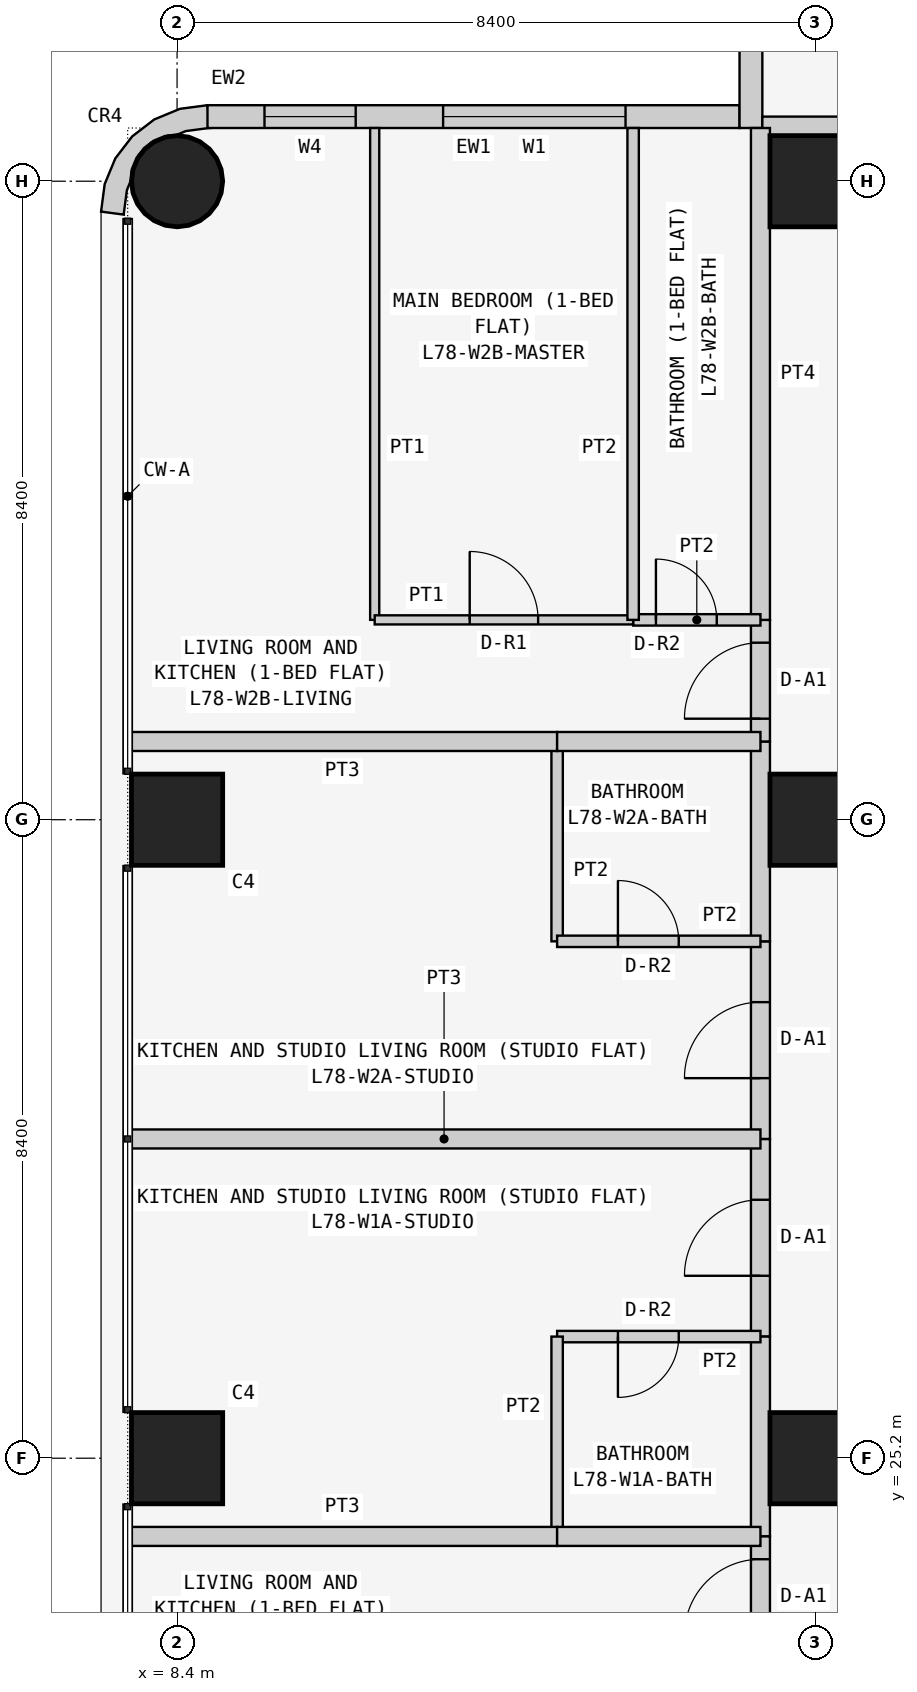
"""IFC4 building model, lengths in metres.
Left out: names, types, materials, properties, quantities, classifications, styles, units other than length and angle.
Written with IfcOpenShell. Run it as: python <this file> out.ifc"""

import sys

from ifc_helpers import new_model, si_unit, direction, frame, frame_2d, origin, origin_2d, place, context, subcontext, project, spatial, polyline, rectangle, circle, outline, extrude, element, fill, save


model = new_model("IFC4")
c1 = context("Model", 3, precision=1e-05, world=origin(), true_north=direction((0.0, 1.0)))
c2 = subcontext(c1, "Body", "Model", "MODEL_VIEW")
j1 = project(units=[si_unit("LENGTHUNIT", "METRE"), si_unit("PLANEANGLEUNIT", "RADIAN")], contexts=[c1])
p1 = place(None, origin())
s1 = spatial("IfcSite", under=j1, at=p1, CompositionType="ELEMENT")
p2 = place(p1, origin())
s2 = spatial("IfcBuilding", under=s1, at=p2, CompositionType="ELEMENT")
p3 = place(p2, frame((0.0, 0.0, 297.3)))
s3 = spatial("IfcBuildingStorey", under=s2, at=p3, CompositionType="ELEMENT", Elevation=297.3)
for number, where, z_axis, x_axis in (
    (1, (8.4, 25.2, 0.0), (0.0, 0.0, 1.0), (1.0, 0.0, 0.0)),
    (2, (8.4, 33.6, 0.0), (0.0, 0.0, 1.0), (1.0, 0.0, 0.0)),
):
    element("IfcColumn", number, at=place(p3, frame(where, z_axis=z_axis, x_axis=x_axis)), inside=s3, PredefinedType="COLUMN", context=c2, shape_type="SweptSolid", body=[
        extrude(rectangle(XDim=1.2, YDim=1.2, at=origin_2d()), origin(), (0.0, 0.0, 1.0), 3.6),
    ])
p4 = place(p3, frame((8.4, 42.0, 0.0), z_axis=(0.0, 0.0, 1.0), x_axis=(1.0, 0.0, 0.0)))
e3 = element("IfcColumn", 3, at=p4, inside=s3, PredefinedType="COLUMN", context=c2, shape_type="SweptSolid", body=[
    extrude(circle(Radius=0.6, at=origin_2d()), origin(), (0.0, 0.0, 1.0), 3.6),
])
for number, where, z_axis, x_axis in (
    (4, (16.8, 25.2, 0.0), (0.0, 0.0, 1.0), (1.0, 0.0, 0.0)),
    (5, (16.8, 33.6, 0.0), (0.0, 0.0, 1.0), (1.0, 0.0, 0.0)),
    (6, (16.8, 42.0, 0.0), (0.0, 0.0, 1.0), (1.0, 0.0, 0.0)),
):
    element("IfcColumn", number, at=place(p3, frame(where, z_axis=z_axis, x_axis=x_axis)), inside=s3, PredefinedType="COLUMN", context=c2, shape_type="SweptSolid", body=[
        extrude(rectangle(XDim=1.2, YDim=1.2, at=origin_2d()), origin(), (0.0, 0.0, 1.0), 3.6),
    ])
p5 = place(p3, frame((15.8, 42.85, 0.0), z_axis=(0.0, 0.0, 1.0), x_axis=(-1.0, 0.0, 0.0)))
e7 = element("IfcWall", 7, at=p5, inside=s3, PredefinedType="SOLIDWALL", context=c2, shape_type="SweptSolid", body=[
    extrude(rectangle(XDim=7.0, YDim=0.3, at=frame_2d((3.5, 0.0))), origin(), (0.0, 0.0, 1.0), 3.35),
])
p6 = place(p5, frame((1.5, 0.0, 0.9)))
e8 = element("IfcOpeningElement", 8, at=p6, cuts=e7, PredefinedType="OPENING", context=c2, shape_type="SweptSolid", body=[
    extrude(rectangle(XDim=2.4, YDim=1.5, at=frame_2d((1.2, 0.75))), frame((0.0, 0.16, 0.0), z_axis=(0.0, -1.0, 0.0), x_axis=(1.0, 0.0, 0.0)), (0.0, 0.0, 1.0), 0.32),
])
p7 = place(p5, frame((5.05, 0.0, 0.9)))
e9 = element("IfcOpeningElement", 9, at=p7, cuts=e7, PredefinedType="OPENING", context=c2, shape_type="SweptSolid", body=[
    extrude(rectangle(XDim=1.2, YDim=1.5, at=frame_2d((0.6, 0.75))), frame((0.0, 0.16, 0.0), z_axis=(0.0, -1.0, 0.0), x_axis=(1.0, 0.0, 0.0)), (0.0, 0.0, 1.0), 0.32),
])
p8 = place(p3, frame((15.95, 50.0, 0.0), z_axis=(0.0, 0.0, 1.0), x_axis=(0.0, -1.0, 0.0)))
e10 = element("IfcWall", 10, at=p8, inside=s3, PredefinedType="SOLIDWALL", context=c2, shape_type="SweptSolid", body=[
    extrude(rectangle(XDim=7.3, YDim=0.3, at=frame_2d((3.65, 0.0))), origin(), (0.0, 0.0, 1.0), 3.35),
])
p9 = place(p8, frame((3.1, 0.0, 0.9)))
e11 = element("IfcOpeningElement", 11, at=p9, cuts=e10, PredefinedType="OPENING", context=c2, shape_type="SweptSolid", body=[
    extrude(rectangle(XDim=2.4, YDim=1.5, at=frame_2d((1.2, 0.75))), frame((0.0, 0.16, 0.0), z_axis=(0.0, -1.0, 0.0), x_axis=(1.0, 0.0, 0.0)), (0.0, 0.0, 1.0), 0.32),
])
p10 = place(p8, frame((0.75, 0.0, 0.9)))
e12 = element("IfcOpeningElement", 12, at=p10, cuts=e10, PredefinedType="OPENING", context=c2, shape_type="SweptSolid", body=[
    extrude(rectangle(XDim=1.2, YDim=1.5, at=frame_2d((0.6, 0.75))), frame((0.0, 0.16, 0.0), z_axis=(0.0, -1.0, 0.0), x_axis=(1.0, 0.0, 0.0)), (0.0, 0.0, 1.0), 0.32),
])
p11 = place(p3, frame((8.762, 42.576, 0.0), z_axis=(0.0, 0.0, 1.0), x_axis=(-0.707106781187, 0.707106781187, 0.0)))
e13 = element("IfcWall", 13, at=p11, inside=s3, PredefinedType="SOLIDWALL", context=c2, shape_type="SweptSolid", body=[
    extrude(outline(polyline([(0.233, 0.114), (0.047, -0.129), (0.033, -0.143), (0.273, -0.327), (0.495, -0.037), (0.635, 0.3), (0.683, 0.663), (0.635, 1.025), (0.495, 1.363), (0.273, 1.653), (0.033, 1.469), (0.047, 1.455), (0.233, 1.212), (0.292, 1.069), (0.358, 1.003), (0.449, 0.783), (0.449, 0.543), (0.358, 0.322), (0.292, 0.257), (0.233, 0.114)])), origin(), (0.0, 0.0, 1.0), 3.35),
])
p12 = place(p3, frame((16.1, 42.725, 0.0), z_axis=(0.0, 0.0, 1.0), x_axis=(1.0, 0.0, 0.0)))
e14 = element("IfcWall", 14, at=p12, inside=s3, PredefinedType="PARTITIONING", context=c2, shape_type="SweptSolid", body=[
    extrude(rectangle(XDim=6.871, YDim=0.25, at=frame_2d((3.436, 0.0))), origin(), (0.0, 0.0, 1.0), 3.35),
])
p13 = place(p3, frame((16.075, 26.8, 0.0), z_axis=(0.0, 0.0, 1.0), x_axis=(0.0, 1.0, 0.0)))
e15 = element("IfcWall", 15, at=p13, inside=s3, PredefinedType="PARTITIONING", context=c2, shape_type="SweptSolid", body=[
    extrude(rectangle(XDim=2.6, YDim=0.25, at=frame_2d((1.3, 0.0))), origin(), (0.0, 0.0, 1.0), 3.35),
])
p14 = place(p13, frame((0.8, 0.0, 0.0)))
e16 = element("IfcOpeningElement", 16, at=p14, cuts=e15, PredefinedType="OPENING", context=c2, shape_type="SweptSolid", body=[
    extrude(rectangle(XDim=1.0, YDim=2.1, at=frame_2d((0.5, 1.05))), frame((0.0, 0.135, 0.0), z_axis=(0.0, -1.0, 0.0), x_axis=(1.0, 0.0, 0.0)), (0.0, 0.0, 1.0), 0.27),
])
p15 = place(p3, frame((16.075, 24.171, 0.0), z_axis=(0.0, 0.0, 1.0), x_axis=(0.0, 1.0, 0.0)))
e17 = element("IfcWall", 17, at=p15, inside=s3, PredefinedType="PARTITIONING", context=c2, shape_type="SweptSolid", body=[
    extrude(rectangle(XDim=2.629, YDim=0.25, at=frame_2d((1.314, 0.0))), origin(), (0.0, 0.0, 1.0), 3.35),
])
p16 = place(p3, frame((16.075, 22.571, 0.0), z_axis=(0.0, 0.0, 1.0), x_axis=(0.0, 1.0, 0.0)))
e18 = element("IfcWall", 18, at=p16, inside=s3, PredefinedType="PARTITIONING", context=c2, shape_type="SweptSolid", body=[
    extrude(rectangle(XDim=1.6, YDim=0.25, at=frame_2d((0.8, 0.0))), origin(), (0.0, 0.0, 1.0), 3.35),
])
p17 = place(p16, frame((0.3, 0.0, 0.0)))
e19 = element("IfcOpeningElement", 19, at=p17, cuts=e18, PredefinedType="OPENING", context=c2, shape_type="SweptSolid", body=[
    extrude(rectangle(XDim=1.0, YDim=2.1, at=frame_2d((0.5, 1.05))), frame((0.0, 0.135, 0.0), z_axis=(0.0, -1.0, 0.0), x_axis=(1.0, 0.0, 0.0)), (0.0, 0.0, 1.0), 0.27),
])
p18 = place(p3, frame((16.075, 29.4, 0.0), z_axis=(0.0, 0.0, 1.0), x_axis=(0.0, 1.0, 0.0)))
e20 = element("IfcWall", 20, at=p18, inside=s3, PredefinedType="PARTITIONING", context=c2, shape_type="SweptSolid", body=[
    extrude(rectangle(XDim=2.6, YDim=0.25, at=frame_2d((1.3, 0.0))), origin(), (0.0, 0.0, 1.0), 3.35),
])
p19 = place(p18, frame((0.8, 0.0, 0.0)))
e21 = element("IfcOpeningElement", 21, at=p19, cuts=e20, PredefinedType="OPENING", context=c2, shape_type="SweptSolid", body=[
    extrude(rectangle(XDim=1.0, YDim=2.1, at=frame_2d((0.5, 1.05))), frame((0.0, 0.135, 0.0), z_axis=(0.0, -1.0, 0.0), x_axis=(1.0, 0.0, 0.0)), (0.0, 0.0, 1.0), 0.27),
])
p20 = place(p3, frame((16.075, 32.0, 0.0), z_axis=(0.0, 0.0, 1.0), x_axis=(0.0, 1.0, 0.0)))
e22 = element("IfcWall", 22, at=p20, inside=s3, PredefinedType="PARTITIONING", context=c2, shape_type="SweptSolid", body=[
    extrude(rectangle(XDim=2.629, YDim=0.25, at=frame_2d((1.314, 0.0))), origin(), (0.0, 0.0, 1.0), 3.35),
])
p21 = place(p3, frame((16.075, 34.629, 0.0), z_axis=(0.0, 0.0, 1.0), x_axis=(0.0, 1.0, 0.0)))
e23 = element("IfcWall", 23, at=p21, inside=s3, PredefinedType="PARTITIONING", context=c2, shape_type="SweptSolid", body=[
    extrude(rectangle(XDim=1.6, YDim=0.25, at=frame_2d((0.8, 0.0))), origin(), (0.0, 0.0, 1.0), 3.35),
])
p22 = place(p21, frame((0.3, 0.0, 0.0)))
e24 = element("IfcOpeningElement", 24, at=p22, cuts=e23, PredefinedType="OPENING", context=c2, shape_type="SweptSolid", body=[
    extrude(rectangle(XDim=1.0, YDim=2.1, at=frame_2d((0.5, 1.05))), frame((0.0, 0.135, 0.0), z_axis=(0.0, -1.0, 0.0), x_axis=(1.0, 0.0, 0.0)), (0.0, 0.0, 1.0), 0.27),
])
p23 = place(p3, frame((16.075, 36.229, 0.0), z_axis=(0.0, 0.0, 1.0), x_axis=(0.0, 1.0, 0.0)))
e25 = element("IfcWall", 25, at=p23, inside=s3, PredefinedType="PARTITIONING", context=c2, shape_type="SweptSolid", body=[
    extrude(rectangle(XDim=6.471, YDim=0.25, at=frame_2d((3.235, 0.0))), origin(), (0.0, 0.0, 1.0), 3.35),
])
p24 = place(p3, frame((16.075, 26.8, 0.0), z_axis=(0.0, 0.0, 1.0), x_axis=(-1.0, 0.0, 0.0)))
e26 = element("IfcWall", 26, at=p24, inside=s3, PredefinedType="PARTITIONING", context=c2, shape_type="SweptSolid", body=[
    extrude(rectangle(XDim=2.675, YDim=0.15, at=frame_2d((1.337, 0.0))), origin(), (0.0, 0.0, 1.0), 3.35),
])
p25 = place(p24, frame((1.075, 0.0, 0.0)))
e27 = element("IfcOpeningElement", 27, at=p25, cuts=e26, PredefinedType="OPENING", context=c2, shape_type="SweptSolid", body=[
    extrude(rectangle(XDim=0.8, YDim=2.1, at=frame_2d((0.4, 1.05))), frame((0.0, 0.085, 0.0), z_axis=(0.0, -1.0, 0.0), x_axis=(1.0, 0.0, 0.0)), (0.0, 0.0, 1.0), 0.17),
])
p26 = place(p3, frame((13.4, 26.8, 0.0), z_axis=(0.0, 0.0, 1.0), x_axis=(0.0, -1.0, 0.0)))
e28 = element("IfcWall", 28, at=p26, inside=s3, PredefinedType="PARTITIONING", context=c2, shape_type="SweptSolid", body=[
    extrude(rectangle(XDim=2.629, YDim=0.15, at=frame_2d((1.314, 0.0))), origin(), (0.0, 0.0, 1.0), 3.35),
])
p27 = place(p3, frame((13.4, 24.171, 0.0), z_axis=(0.0, 0.0, 1.0), x_axis=(-1.0, 0.0, 0.0)))
e29 = element("IfcWall", 29, at=p27, inside=s3, PredefinedType="PARTITIONING", context=c2, shape_type="SweptSolid", body=[
    extrude(rectangle(XDim=5.65, YDim=0.25, at=frame_2d((2.825, 0.0))), origin(), (0.0, 0.0, 1.0), 3.35),
])
p28 = place(p3, frame((7.75, 29.4, 0.0), z_axis=(0.0, 0.0, 1.0), x_axis=(1.0, 0.0, 0.0)))
e30 = element("IfcWall", 30, at=p28, inside=s3, PredefinedType="PARTITIONING", context=c2, shape_type="SweptSolid", body=[
    extrude(rectangle(XDim=8.325, YDim=0.25, at=frame_2d((4.163, 0.0))), origin(), (0.0, 0.0, 1.0), 3.35),
])
p29 = place(p3, frame((13.4, 24.171, 0.0), z_axis=(0.0, 0.0, 1.0), x_axis=(1.0, 0.0, 0.0)))
e31 = element("IfcWall", 31, at=p29, inside=s3, PredefinedType="PARTITIONING", context=c2, shape_type="SweptSolid", body=[
    extrude(rectangle(XDim=2.675, YDim=0.25, at=frame_2d((1.337, 0.0))), origin(), (0.0, 0.0, 1.0), 3.35),
])
p30 = place(p3, frame((13.4, 34.629, 0.0), z_axis=(0.0, 0.0, 1.0), x_axis=(0.0, -1.0, 0.0)))
e32 = element("IfcWall", 32, at=p30, inside=s3, PredefinedType="PARTITIONING", context=c2, shape_type="SweptSolid", body=[
    extrude(rectangle(XDim=2.629, YDim=0.15, at=frame_2d((1.314, 0.0))), origin(), (0.0, 0.0, 1.0), 3.35),
])
p31 = place(p3, frame((13.4, 32.0, 0.0), z_axis=(0.0, 0.0, 1.0), x_axis=(1.0, 0.0, 0.0)))
e33 = element("IfcWall", 33, at=p31, inside=s3, PredefinedType="PARTITIONING", context=c2, shape_type="SweptSolid", body=[
    extrude(rectangle(XDim=2.675, YDim=0.15, at=frame_2d((1.337, 0.0))), origin(), (0.0, 0.0, 1.0), 3.35),
])
p32 = place(p31, frame((0.8, 0.0, 0.0)))
e34 = element("IfcOpeningElement", 34, at=p32, cuts=e33, PredefinedType="OPENING", context=c2, shape_type="SweptSolid", body=[
    extrude(rectangle(XDim=0.8, YDim=2.1, at=frame_2d((0.4, 1.05))), frame((0.0, 0.085, 0.0), z_axis=(0.0, -1.0, 0.0), x_axis=(1.0, 0.0, 0.0)), (0.0, 0.0, 1.0), 0.17),
])
p33 = place(p3, frame((7.75, 34.629, 0.0), z_axis=(0.0, 0.0, 1.0), x_axis=(1.0, 0.0, 0.0)))
e35 = element("IfcWall", 35, at=p33, inside=s3, PredefinedType="PARTITIONING", context=c2, shape_type="SweptSolid", body=[
    extrude(rectangle(XDim=5.65, YDim=0.25, at=frame_2d((2.825, 0.0))), origin(), (0.0, 0.0, 1.0), 3.35),
])
p34 = place(p3, frame((13.4, 34.629, 0.0), z_axis=(0.0, 0.0, 1.0), x_axis=(1.0, 0.0, 0.0)))
e36 = element("IfcWall", 36, at=p34, inside=s3, PredefinedType="PARTITIONING", context=c2, shape_type="SweptSolid", body=[
    extrude(rectangle(XDim=2.675, YDim=0.25, at=frame_2d((1.337, 0.0))), origin(), (0.0, 0.0, 1.0), 3.35),
])
p35 = place(p3, frame((14.4, 36.229, 0.0), z_axis=(0.0, 0.0, 1.0), x_axis=(1.0, 0.0, 0.0)))
e37 = element("IfcWall", 37, at=p35, inside=s3, PredefinedType="PARTITIONING", context=c2, shape_type="SweptSolid", body=[
    extrude(rectangle(XDim=1.675, YDim=0.15, at=frame_2d((0.837, 0.0))), origin(), (0.0, 0.0, 1.0), 3.35),
])
p36 = place(p35, frame((0.3, 0.0, 0.0)))
e38 = element("IfcOpeningElement", 38, at=p36, cuts=e37, PredefinedType="OPENING", context=c2, shape_type="SweptSolid", body=[
    extrude(rectangle(XDim=0.8, YDim=2.1, at=frame_2d((0.4, 1.05))), frame((0.0, 0.085, 0.0), z_axis=(0.0, -1.0, 0.0), x_axis=(1.0, 0.0, 0.0)), (0.0, 0.0, 1.0), 0.17),
])
p37 = place(p3, frame((11.0, 42.7, 0.0), z_axis=(0.0, 0.0, 1.0), x_axis=(0.0, -1.0, 0.0)))
e39 = element("IfcWall", 39, at=p37, inside=s3, PredefinedType="PARTITIONING", context=c2, shape_type="SweptSolid", body=[
    extrude(rectangle(XDim=6.471, YDim=0.12, at=frame_2d((3.235, 0.0))), origin(), (0.0, 0.0, 1.0), 3.35),
])
p38 = place(p3, frame((11.0, 36.229, 0.0), z_axis=(0.0, 0.0, 1.0), x_axis=(1.0, 0.0, 0.0)))
e40 = element("IfcWall", 40, at=p38, inside=s3, PredefinedType="PARTITIONING", context=c2, shape_type="SweptSolid", body=[
    extrude(rectangle(XDim=3.4, YDim=0.12, at=frame_2d((1.7, 0.0))), origin(), (0.0, 0.0, 1.0), 3.35),
])
p39 = place(p38, frame((1.25, 0.0, 0.0)))
e41 = element("IfcOpeningElement", 41, at=p39, cuts=e40, PredefinedType="OPENING", context=c2, shape_type="SweptSolid", body=[
    extrude(rectangle(XDim=0.9, YDim=2.1, at=frame_2d((0.45, 1.05))), frame((0.0, 0.07, 0.0), z_axis=(0.0, -1.0, 0.0), x_axis=(1.0, 0.0, 0.0)), (0.0, 0.0, 1.0), 0.14),
])
p40 = place(p3, frame((14.4, 36.229, 0.0), z_axis=(0.0, 0.0, 1.0), x_axis=(0.0, 1.0, 0.0)))
e42 = element("IfcWall", 42, at=p40, inside=s3, PredefinedType="PARTITIONING", context=c2, shape_type="SweptSolid", body=[
    extrude(rectangle(XDim=6.471, YDim=0.15, at=frame_2d((3.235, 0.0))), origin(), (0.0, 0.0, 1.0), 3.35),
])
p41 = place(p6, origin())
e43 = element("IfcWindow", 43, at=p41, inside=s3, PartitioningType="SINGLE_PANEL", PredefinedType="WINDOW", context=c2, shape_type="SweptSolid", body=[
    extrude(rectangle(XDim=2.4, YDim=1.5, at=frame_2d((1.2, 0.75))), frame((0.0, 0.03, 0.0), z_axis=(0.0, -1.0, 0.0), x_axis=(1.0, 0.0, 0.0)), (0.0, 0.0, 1.0), 0.06),
])
fill(e8, e43)
p42 = place(p7, origin())
e44 = element("IfcWindow", 44, at=p42, inside=s3, PartitioningType="SINGLE_PANEL", PredefinedType="WINDOW", context=c2, shape_type="SweptSolid", body=[
    extrude(rectangle(XDim=1.2, YDim=1.5, at=frame_2d((0.6, 0.75))), frame((0.0, 0.03, 0.0), z_axis=(0.0, -1.0, 0.0), x_axis=(1.0, 0.0, 0.0)), (0.0, 0.0, 1.0), 0.06),
])
fill(e9, e44)
p43 = place(p14, origin())
e45 = element("IfcDoor", 45, at=p43, inside=s3, OperationType="SINGLE_SWING_LEFT", PredefinedType="DOOR", context=c2, shape_type="SweptSolid", body=[
    extrude(rectangle(XDim=1.0, YDim=2.1, at=frame_2d((0.5, 1.05))), frame((0.0, 0.025, 0.0), z_axis=(0.0, -1.0, 0.0), x_axis=(1.0, 0.0, 0.0)), (0.0, 0.0, 1.0), 0.05),
])
fill(e16, e45)
p44 = place(p25, origin())
e46 = element("IfcDoor", 46, at=p44, inside=s3, OperationType="SINGLE_SWING_RIGHT", PredefinedType="DOOR", context=c2, shape_type="SweptSolid", body=[
    extrude(rectangle(XDim=0.8, YDim=2.1, at=frame_2d((0.4, 1.05))), frame((0.0, 0.025, 0.0), z_axis=(0.0, -1.0, 0.0), x_axis=(1.0, 0.0, 0.0)), (0.0, 0.0, 1.0), 0.05),
])
fill(e27, e46)
p45 = place(p17, origin())
e47 = element("IfcDoor", 47, at=p45, inside=s3, OperationType="SINGLE_SWING_LEFT", PredefinedType="DOOR", context=c2, shape_type="SweptSolid", body=[
    extrude(rectangle(XDim=1.0, YDim=2.1, at=frame_2d((0.5, 1.05))), frame((0.0, 0.025, 0.0), z_axis=(0.0, -1.0, 0.0), x_axis=(1.0, 0.0, 0.0)), (0.0, 0.0, 1.0), 0.05),
])
fill(e19, e47)
p46 = place(p19, origin())
e48 = element("IfcDoor", 48, at=p46, inside=s3, OperationType="SINGLE_SWING_LEFT", PredefinedType="DOOR", context=c2, shape_type="SweptSolid", body=[
    extrude(rectangle(XDim=1.0, YDim=2.1, at=frame_2d((0.5, 1.05))), frame((0.0, 0.025, 0.0), z_axis=(0.0, -1.0, 0.0), x_axis=(1.0, 0.0, 0.0)), (0.0, 0.0, 1.0), 0.05),
])
fill(e21, e48)
p47 = place(p32, origin())
e49 = element("IfcDoor", 49, at=p47, inside=s3, OperationType="SINGLE_SWING_LEFT", PredefinedType="DOOR", context=c2, shape_type="SweptSolid", body=[
    extrude(rectangle(XDim=0.8, YDim=2.1, at=frame_2d((0.4, 1.05))), frame((0.0, 0.025, 0.0), z_axis=(0.0, -1.0, 0.0), x_axis=(1.0, 0.0, 0.0)), (0.0, 0.0, 1.0), 0.05),
])
fill(e34, e49)
p48 = place(p22, origin())
e50 = element("IfcDoor", 50, at=p48, inside=s3, OperationType="SINGLE_SWING_LEFT", PredefinedType="DOOR", context=c2, shape_type="SweptSolid", body=[
    extrude(rectangle(XDim=1.0, YDim=2.1, at=frame_2d((0.5, 1.05))), frame((0.0, 0.025, 0.0), z_axis=(0.0, -1.0, 0.0), x_axis=(1.0, 0.0, 0.0)), (0.0, 0.0, 1.0), 0.05),
])
fill(e24, e50)
p49 = place(p36, origin())
e51 = element("IfcDoor", 51, at=p49, inside=s3, OperationType="SINGLE_SWING_LEFT", PredefinedType="DOOR", context=c2, shape_type="SweptSolid", body=[
    extrude(rectangle(XDim=0.8, YDim=2.1, at=frame_2d((0.4, 1.05))), frame((0.0, 0.025, 0.0), z_axis=(0.0, -1.0, 0.0), x_axis=(1.0, 0.0, 0.0)), (0.0, 0.0, 1.0), 0.05),
])
fill(e38, e51)
p50 = place(p39, origin())
e52 = element("IfcDoor", 52, at=p50, inside=s3, OperationType="SINGLE_SWING_LEFT", PredefinedType="DOOR", context=c2, shape_type="SweptSolid", body=[
    extrude(rectangle(XDim=0.9, YDim=2.1, at=frame_2d((0.45, 1.05))), frame((0.0, 0.025, 0.0), z_axis=(0.0, -1.0, 0.0), x_axis=(1.0, 0.0, 0.0)), (0.0, 0.0, 1.0), 0.05),
])
fill(e41, e52)
save(model, sys.argv[1])
